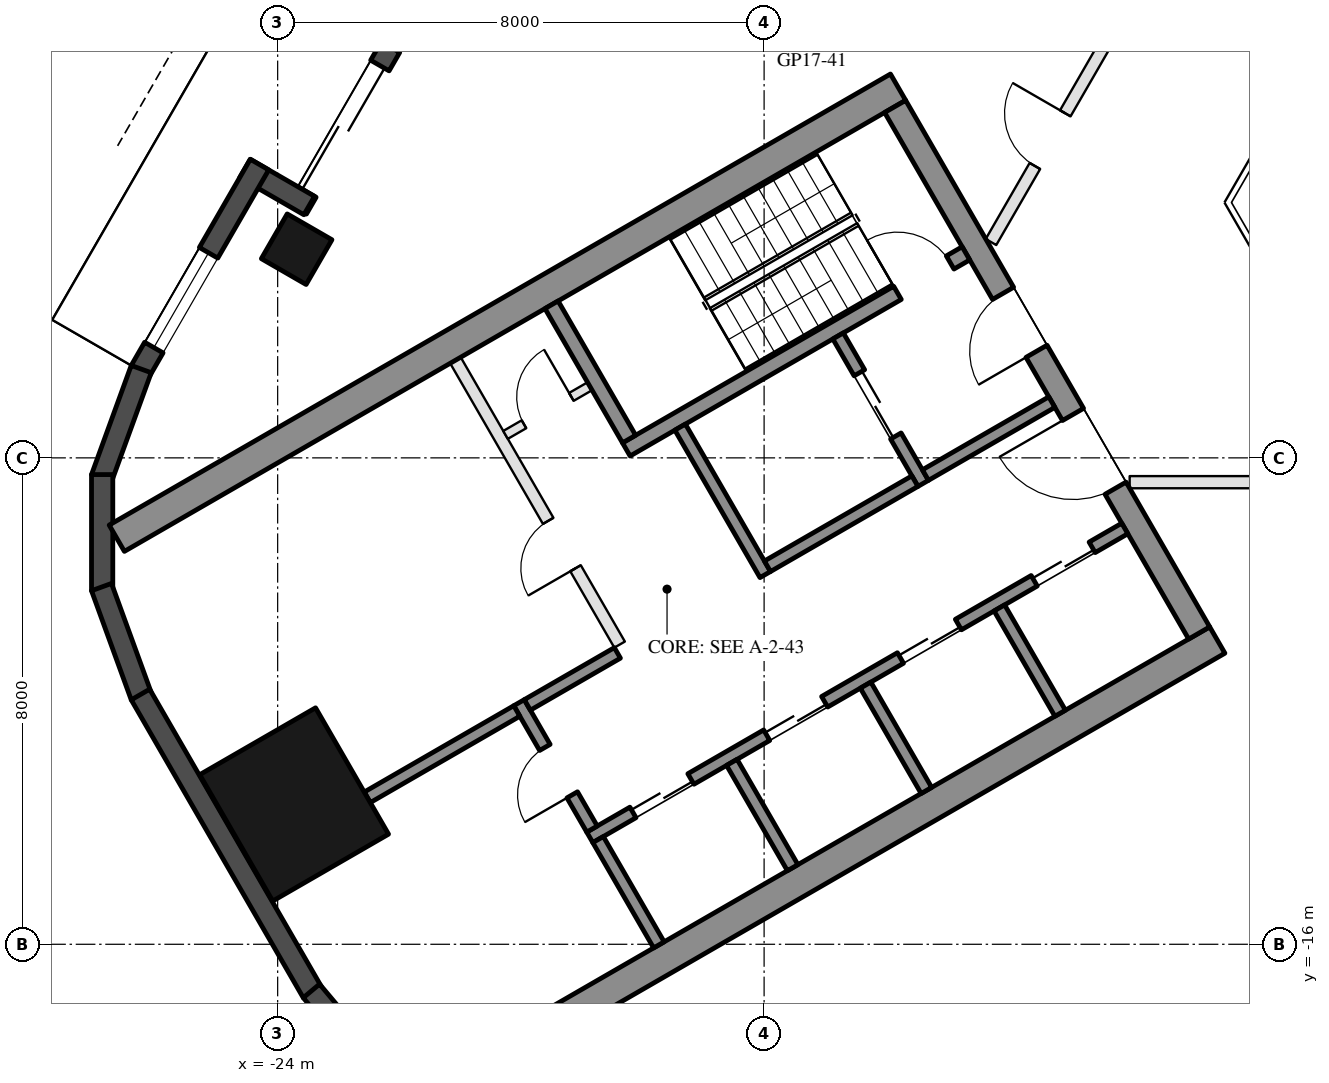
"""IFC4 building model, lengths in metres.
Left out: names, types, materials, properties, quantities, classifications, styles, units other than length and angle.
Written with IfcOpenShell. Run it as: python <this file> out.ifc"""

import sys

from ifc_helpers import new_model, si_unit, direction, frame, frame_2d, origin, origin_2d, place, context, subcontext, project, spatial, rectangle, hollow_rectangle, extrude, element, fill, save


model = new_model("IFC4")
c1 = context("Model", 3, precision=1e-05, world=origin(), true_north=direction((0.0, 1.0)))
c2 = subcontext(c1, "Body", "Model", "MODEL_VIEW")
j1 = project(units=[si_unit("LENGTHUNIT", "METRE"), si_unit("PLANEANGLEUNIT", "RADIAN")], contexts=[c1])
p1 = place(None, origin())
s1 = spatial("IfcSite", under=j1, at=p1, CompositionType="ELEMENT")
p2 = place(p1, origin())
s2 = spatial("IfcBuilding", under=s1, at=p2, CompositionType="ELEMENT")
p3 = place(p2, frame((0.0, 0.0, 183.6)))
s3 = spatial("IfcBuildingStorey", under=s2, at=p3, CompositionType="ELEMENT", Elevation=183.6)
p4 = place(p3, frame((-23.688, -4.568, 0.0), z_axis=(0.0, 0.0, 1.0), x_axis=(0.5, 0.866025403784, 0.0)))
e1 = element("IfcColumn", 1, at=p4, inside=s3, PredefinedType="COLUMN", context=c2, shape_type="SweptSolid", body=[
    extrude(hollow_rectangle(XDim=0.85, YDim=0.85, WallThickness=0.04, at=origin_2d()), origin(), (0.0, 0.0, 1.0), 3.7),
])
p5 = place(p3, frame((-23.729, -13.7, 0.0), z_axis=(0.0, 0.0, 1.0), x_axis=(-0.5, 0.866025403784, 0.0)))
e2 = element("IfcColumn", 2, at=p5, inside=s3, PredefinedType="COLUMN", context=c2, shape_type="SweptSolid", body=[
    extrude(hollow_rectangle(XDim=2.4, YDim=2.2, WallThickness=0.06, at=origin_2d()), origin(), (0.0, 0.0, 1.0), 3.7),
])
p6 = place(p3, frame((-20.309, 1.934, 0.0), z_axis=(0.0, 0.0, 1.0), x_axis=(-0.499992114976, -0.866029956157, 0.0)))
e3 = element("IfcWall", 3, at=p6, inside=s3, PredefinedType="SOLIDWALL", context=c2, shape_type="SweptSolid", body=[
    extrude(rectangle(XDim=6.74, YDim=0.35, at=frame_2d((3.37, 0.0))), origin(), (0.0, 0.0, 1.0), 3.55),
])
p7 = place(p6, frame((4.02, 0.0, 0.0)))
e4 = element("IfcOpeningElement", 4, at=p7, cuts=e3, PredefinedType="OPENING", context=c2, shape_type="SweptSolid", body=[
    extrude(rectangle(XDim=2.4, YDim=2.4, at=frame_2d((1.2, 1.2))), frame((0.0, 0.185, 0.0), z_axis=(0.0, -1.0, 0.0), x_axis=(1.0, 0.0, 0.0)), (0.0, 0.0, 1.0), 0.37),
])
p8 = place(p6, frame((0.77, 0.0, 0.3)))
e5 = element("IfcOpeningElement", 5, at=p8, cuts=e3, PredefinedType="OPENING", context=c2, shape_type="SweptSolid", body=[
    extrude(rectangle(XDim=2.9, YDim=2.65, at=frame_2d((1.45, 1.325))), frame((0.0, 0.185, 0.0), z_axis=(0.0, -1.0, 0.0), x_axis=(1.0, 0.0, 0.0)), (0.0, 0.0, 1.0), 0.37),
])
p9 = place(p3, frame((-23.481, -3.85, 0.0), z_axis=(0.0, 0.0, 1.0), x_axis=(-0.866092288191, 0.499884134912, 0.0)))
e6 = element("IfcWall", 6, at=p9, inside=s3, PredefinedType="SOLIDWALL", context=c2, shape_type="SweptSolid", body=[
    extrude(rectangle(XDim=1.22, YDim=0.35, at=frame_2d((0.61, 0.0))), origin(), (0.0, 0.0, 1.0), 3.55),
])
p10 = place(p3, frame((-24.299, -3.176, 0.0), z_axis=(0.0, 0.0, 1.0), x_axis=(-0.500028278809, -0.866009076391, 0.0)))
e7 = element("IfcWall", 7, at=p10, inside=s3, PredefinedType="SOLIDWALL", context=c2, shape_type="SweptSolid", body=[
    extrude(rectangle(XDim=3.916, YDim=0.35, at=frame_2d((1.958, 0.0))), origin(), (0.0, 0.0, 1.0), 3.55),
])
p11 = place(p10, frame((1.675, 0.0, 0.3)))
e8 = element("IfcOpeningElement", 8, at=p11, cuts=e7, PredefinedType="OPENING", context=c2, shape_type="SweptSolid", body=[
    extrude(rectangle(XDim=1.8, YDim=2.65, at=frame_2d((0.9, 1.325))), frame((0.0, 0.185, 0.0), z_axis=(0.0, -1.0, 0.0), x_axis=(1.0, 0.0, 0.0)), (0.0, 0.0, 1.0), 0.37),
])
for number, where, z_axis, x_axis in (
    (9, (-26.244, -6.54, 0.0), (0.0, 0.0, 1.0), (-0.342, -0.94, 0.0)),
    (10, (-26.886, -8.275, 0.0), (0.0, 0.0, 1.0), (0.0, -1.0, 0.0)),
    (11, (-26.897, -10.125, 0.0), (0.0, 0.0, 1.0), (0.342, -0.94, 0.0)),
):
    element("IfcWall", number, at=place(p3, frame(where, z_axis=z_axis, x_axis=x_axis)), inside=s3, PredefinedType="SOLIDWALL", context=c2, shape_type="SweptSolid", body=[
        extrude(rectangle(XDim=1.91, YDim=0.35, at=frame_2d((0.955, 0.0))), origin(), (0.0, 0.0, 1.0), 3.55),
    ])
p12 = place(p3, frame((-26.257, -11.893, 0.0), z_axis=(0.0, 0.0, 1.0), x_axis=(0.500018773155, -0.866014564827, 0.0)))
e12 = element("IfcWall", 12, at=p12, inside=s3, PredefinedType="SOLIDWALL", context=c2, shape_type="SweptSolid", body=[
    extrude(rectangle(XDim=5.658, YDim=0.35, at=frame_2d((2.829, 0.0))), origin(), (0.0, 0.0, 1.0), 3.55),
])
p13 = place(p3, frame((-23.445, -16.768, 0.0), z_axis=(0.0, 0.0, 1.0), x_axis=(0.642733291068, -0.76609001857, 0.0)))
e13 = element("IfcWall", 13, at=p13, inside=s3, PredefinedType="SOLIDWALL", context=c2, shape_type="SweptSolid", body=[
    extrude(rectangle(XDim=1.91, YDim=0.35, at=frame_2d((0.955, 0.0))), origin(), (0.0, 0.0, 1.0), 3.55),
])
for number, where, z_axis, x_axis in (
    (14, (-13.797, -1.903, 0.0), (0.0, 0.0, 1.0), (-0.866, -0.5, 0.0)),
    (15, (-8.547, -10.997, 0.0), (0.0, 0.0, 1.0), (-0.866, -0.5, 0.0)),
):
    element("IfcWall", number, at=place(p3, frame(where, z_axis=z_axis, x_axis=x_axis)), inside=s3, PredefinedType="SHEAR", context=c2, shape_type="SweptSolid", body=[
        extrude(rectangle(XDim=14.837, YDim=0.5, at=frame_2d((7.418, 0.0))), origin(), (0.0, 0.0, 1.0), 3.5),
    ])
p14 = place(p3, frame((-13.845, -2.22, 0.0), z_axis=(0.0, 0.0, 1.0), x_axis=(0.500004234368, -0.866022959057, 0.0)))
e16 = element("IfcWall", 16, at=p14, inside=s3, PredefinedType="SHEAR", context=c2, shape_type="SweptSolid", body=[
    extrude(rectangle(XDim=10.0, YDim=0.4, at=frame_2d((5.0, 0.0))), origin(), (0.0, 0.0, 1.0), 3.5),
])
p15 = place(p14, frame((3.55, 0.0, 0.0)))
e17 = element("IfcOpeningElement", 17, at=p15, cuts=e16, PredefinedType="OPENING", context=c2, shape_type="SweptSolid", body=[
    extrude(rectangle(XDim=1.1, YDim=2.1, at=frame_2d((0.55, 1.05))), frame((0.0, 0.21, 0.0), z_axis=(0.0, -1.0, 0.0), x_axis=(1.0, 0.0, 0.0)), (0.0, 0.0, 1.0), 0.42),
])
p16 = place(p14, frame((5.85, 0.0, 0.0)))
e18 = element("IfcOpeningElement", 18, at=p16, cuts=e16, PredefinedType="OPENING", context=c2, shape_type="SweptSolid", body=[
    extrude(rectangle(XDim=1.4, YDim=2.1, at=frame_2d((0.7, 1.05))), frame((0.0, 0.21, 0.0), z_axis=(0.0, -1.0, 0.0), x_axis=(1.0, 0.0, 0.0)), (0.0, 0.0, 1.0), 0.42),
])
p17 = place(p3, frame((-12.681, -4.636, 0.0), z_axis=(0.0, 0.0, 1.0), x_axis=(-0.866021702275, -0.500006411147, 0.0)))
e19 = element("IfcWall", 19, at=p17, inside=s3, PredefinedType="SHEAR", context=c2, shape_type="SweptSolid", body=[
    extrude(rectangle(XDim=6.45, YDim=0.25, at=frame_2d((3.225, 0.0))), origin(), (0.0, 0.0, 1.0), 3.5),
])
p18 = place(p17, frame((0.3, 0.0, 0.0)))
e20 = element("IfcOpeningElement", 20, at=p18, cuts=e19, PredefinedType="OPENING", context=c2, shape_type="SweptSolid", body=[
    extrude(rectangle(XDim=1.0, YDim=2.1, at=frame_2d((0.5, 1.05))), frame((0.0, 0.135, 0.0), z_axis=(0.0, -1.0, 0.0), x_axis=(1.0, 0.0, 0.0)), (0.0, 0.0, 1.0), 0.27),
])
p19 = place(p3, frame((-19.496, -5.482, 0.0), z_axis=(0.0, 0.0, 1.0), x_axis=(0.499990435942, -0.866030925526, 0.0)))
e21 = element("IfcWall", 21, at=p19, inside=s3, PredefinedType="SHEAR", context=c2, shape_type="SweptSolid", body=[
    extrude(rectangle(XDim=2.55, YDim=0.25, at=frame_2d((1.275, 0.0))), origin(), (0.0, 0.0, 1.0), 3.5),
])
p20 = place(p3, frame((-17.381, -7.495, 0.0), z_axis=(0.0, 0.0, 1.0), x_axis=(0.500011755427, -0.866018616679, 0.0)))
e22 = element("IfcWall", 22, at=p20, inside=s3, PredefinedType="SHEAR", context=c2, shape_type="SweptSolid", body=[
    extrude(rectangle(XDim=2.8, YDim=0.2, at=frame_2d((1.4, 0.0))), origin(), (0.0, 0.0, 1.0), 3.5),
])
p21 = place(p3, frame((-14.783, -5.995, 0.0), z_axis=(0.0, 0.0, 1.0), x_axis=(0.49994636267, -0.866056369097, 0.0)))
e23 = element("IfcWall", 23, at=p21, inside=s3, PredefinedType="SHEAR", context=c2, shape_type="SweptSolid", body=[
    extrude(rectangle(XDim=2.8, YDim=0.2, at=frame_2d((1.4, 0.0))), origin(), (0.0, 0.0, 1.0), 3.5),
])
p22 = place(p21, frame((0.7, 0.0, 0.0)))
e24 = element("IfcOpeningElement", 24, at=p22, cuts=e23, PredefinedType="OPENING", context=c2, shape_type="SweptSolid", body=[
    extrude(rectangle(XDim=1.2, YDim=2.1, at=frame_2d((0.6, 1.05))), frame((0.0, 0.11, 0.0), z_axis=(0.0, -1.0, 0.0), x_axis=(1.0, 0.0, 0.0)), (0.0, 0.0, 1.0), 0.22),
])
p23 = place(p3, frame((-13.52, -8.383, 0.0), z_axis=(0.0, 0.0, 1.0), x_axis=(-0.866034573852, -0.49998411664, 0.0)))
e25 = element("IfcWall", 25, at=p23, inside=s3, PredefinedType="SHEAR", context=c2, shape_type="SweptSolid", body=[
    extrude(rectangle(XDim=2.8, YDim=0.2, at=frame_2d((1.4, 0.0))), origin(), (0.0, 0.0, 1.0), 3.5),
])
p24 = place(p3, frame((-11.268, -7.083, 0.0), z_axis=(0.0, 0.0, 1.0), x_axis=(-0.866050077142, -0.499957262057, 0.0)))
e26 = element("IfcWall", 26, at=p24, inside=s3, PredefinedType="SHEAR", context=c2, shape_type="SweptSolid", body=[
    extrude(rectangle(XDim=2.4, YDim=0.2, at=frame_2d((1.2, 0.0))), origin(), (0.0, 0.0, 1.0), 3.5),
])
p25 = place(p3, frame((-10.068, -9.162, 0.0), z_axis=(0.0, 0.0, 1.0), x_axis=(-0.866032725843, -0.499987317609, 0.0)))
e27 = element("IfcWall", 27, at=p25, inside=s3, PredefinedType="SHEAR", context=c2, shape_type="SweptSolid", body=[
    extrude(rectangle(XDim=10.16, YDim=0.2, at=frame_2d((5.08, 0.0))), origin(), (0.0, 0.0, 1.0), 3.5),
])
p26 = place(p25, frame((0.62, 0.0, 0.0)))
e28 = element("IfcOpeningElement", 28, at=p26, cuts=e27, PredefinedType="OPENING", context=c2, shape_type="SweptSolid", body=[
    extrude(rectangle(XDim=1.1, YDim=2.1, at=frame_2d((0.55, 1.05))), frame((0.0, 0.11, 0.0), z_axis=(0.0, -1.0, 0.0), x_axis=(1.0, 0.0, 0.0)), (0.0, 0.0, 1.0), 0.22),
])
p27 = place(p25, frame((3.16, 0.0, 0.0)))
e29 = element("IfcOpeningElement", 29, at=p27, cuts=e27, PredefinedType="OPENING", context=c2, shape_type="SweptSolid", body=[
    extrude(rectangle(XDim=1.1, YDim=2.1, at=frame_2d((0.55, 1.05))), frame((0.0, 0.11, 0.0), z_axis=(0.0, -1.0, 0.0), x_axis=(1.0, 0.0, 0.0)), (0.0, 0.0, 1.0), 0.22),
])
p28 = place(p25, frame((5.7, 0.0, 0.0)))
e30 = element("IfcOpeningElement", 30, at=p28, cuts=e27, PredefinedType="OPENING", context=c2, shape_type="SweptSolid", body=[
    extrude(rectangle(XDim=1.1, YDim=2.1, at=frame_2d((0.55, 1.05))), frame((0.0, 0.11, 0.0), z_axis=(0.0, -1.0, 0.0), x_axis=(1.0, 0.0, 0.0)), (0.0, 0.0, 1.0), 0.22),
])
p29 = place(p25, frame((8.24, 0.0, 0.0)))
e31 = element("IfcOpeningElement", 31, at=p29, cuts=e27, PredefinedType="OPENING", context=c2, shape_type="SweptSolid", body=[
    extrude(rectangle(XDim=1.1, YDim=2.1, at=frame_2d((0.55, 1.05))), frame((0.0, 0.11, 0.0), z_axis=(0.0, -1.0, 0.0), x_axis=(1.0, 0.0, 0.0)), (0.0, 0.0, 1.0), 0.22),
])
p30 = place(p3, frame((-20.031, -12.026, 0.0), z_axis=(0.0, 0.0, 1.0), x_axis=(0.500033551112, -0.866006032174, 0.0)))
e32 = element("IfcWall", 32, at=p30, inside=s3, PredefinedType="SHEAR", context=c2, shape_type="SweptSolid", body=[
    extrude(rectangle(XDim=2.4, YDim=0.2, at=frame_2d((1.2, 0.0))), origin(), (0.0, 0.0, 1.0), 3.5),
])
p31 = place(p30, frame((0.85, 0.0, 0.0)))
e33 = element("IfcOpeningElement", 33, at=p31, cuts=e32, PredefinedType="OPENING", context=c2, shape_type="SweptSolid", body=[
    extrude(rectangle(XDim=0.9, YDim=2.1, at=frame_2d((0.45, 1.05))), frame((0.0, 0.11, 0.0), z_axis=(0.0, -1.0, 0.0), x_axis=(1.0, 0.0, 0.0)), (0.0, 0.0, 1.0), 0.22),
])
p32 = place(p3, frame((-18.413, -11.208, 0.0), z_axis=(0.0, 0.0, 1.0), x_axis=(-0.866038183914, -0.499977863513, 0.0)))
e34 = element("IfcWall", 34, at=p32, inside=s3, PredefinedType="SHEAR", context=c2, shape_type="SweptSolid", body=[
    extrude(rectangle(XDim=1.71, YDim=0.2, at=frame_2d((0.855, 0.0))), origin(), (0.0, 0.0, 1.0), 3.5),
])
for number, where, z_axis, x_axis in (
    (35, (-12.131, -10.468, 0.0), (0.0, 0.0, 1.0), (0.5, -0.866, 0.0)),
    (36, (-14.331, -11.738, 0.0), (0.0, 0.0, 1.0), (0.5, -0.866, 0.0)),
    (37, (-16.531, -13.008, 0.0), (0.0, 0.0, 1.0), (0.5, -0.866, 0.0)),
    (38, (-18.73, -14.278, 0.0), (0.0, 0.0, 1.0), (0.5, -0.866, 0.0)),
):
    element("IfcWall", number, at=place(p3, frame(where, z_axis=z_axis, x_axis=x_axis)), inside=s3, PredefinedType="SHEAR", context=c2, shape_type="SweptSolid", body=[
        extrude(rectangle(XDim=2.0, YDim=0.2, at=frame_2d((1.0, 0.0))), origin(), (0.0, 0.0, 1.0), 3.5),
    ])
p33 = place(p3, frame((-20.067, -12.163, 0.0), z_axis=(0.0, 0.0, 1.0), x_axis=(-0.866055327414, -0.49994816717, 0.0)))
e39 = element("IfcWall", 39, at=p33, inside=s3, PredefinedType="SHEAR", context=c2, shape_type="SweptSolid", body=[
    extrude(rectangle(XDim=2.84, YDim=0.2, at=frame_2d((1.42, 0.0))), origin(), (0.0, 0.0, 1.0), 3.5),
])
p34 = place(p3, frame((-21.076, -6.395, 0.0), z_axis=(0.0, 0.0, 1.0), x_axis=(0.50001468107, -0.866016927499, 0.0)))
e40 = element("IfcWall", 40, at=p34, inside=s3, PredefinedType="PARTITIONING", context=c2, shape_type="SweptSolid", body=[
    extrude(rectangle(XDim=5.4, YDim=0.2, at=frame_2d((2.7, 0.0))), origin(), (0.0, 0.0, 1.0), 3.5),
])
p35 = place(p34, frame((3.05, 0.0, 0.0)))
e41 = element("IfcOpeningElement", 41, at=p35, cuts=e40, PredefinedType="OPENING", context=c2, shape_type="SweptSolid", body=[
    extrude(rectangle(XDim=0.9, YDim=2.1, at=frame_2d((0.45, 1.05))), frame((0.0, 0.11, 0.0), z_axis=(0.0, -1.0, 0.0), x_axis=(1.0, 0.0, 0.0)), (0.0, 0.0, 1.0), 0.22),
])
p36 = place(p3, frame((-18.866, -6.822, 0.0), z_axis=(0.0, 0.0, 1.0), x_axis=(-0.866028054938, -0.499995408039, 0.0)))
e42 = element("IfcWall", 42, at=p36, inside=s3, PredefinedType="PARTITIONING", context=c2, shape_type="SweptSolid", body=[
    extrude(rectangle(XDim=1.6, YDim=0.15, at=frame_2d((0.8, 0.0))), origin(), (0.0, 0.0, 1.0), 3.5),
])
p37 = place(p36, frame((0.35, 0.0, 0.0)))
e43 = element("IfcOpeningElement", 43, at=p37, cuts=e42, PredefinedType="OPENING", context=c2, shape_type="SweptSolid", body=[
    extrude(rectangle(XDim=0.9, YDim=2.1, at=frame_2d((0.45, 1.05))), frame((0.0, 0.085, 0.0), z_axis=(0.0, -1.0, 0.0), x_axis=(1.0, 0.0, 0.0)), (0.0, 0.0, 1.0), 0.17),
])
p38 = place(p3, frame((-3.803, -8.4, 0.0), z_axis=(0.0, 0.0, 1.0), x_axis=(-1.0, 0.0, 0.0)))
e44 = element("IfcWall", 44, at=p38, inside=s3, PredefinedType="PARTITIONING", context=c2, shape_type="SweptSolid", body=[
    extrude(rectangle(XDim=6.185, YDim=0.2, at=frame_2d((3.092, 0.0))), origin(), (0.0, 0.0, 1.0), 2.95),
])
p39 = place(p38, frame((2.592, 0.0, 0.0)))
e45 = element("IfcOpeningElement", 45, at=p39, cuts=e44, PredefinedType="OPENING", context=c2, shape_type="SweptSolid", body=[
    extrude(rectangle(XDim=1.0, YDim=2.1, at=frame_2d((0.5, 1.05))), frame((0.0, 0.11, 0.0), z_axis=(0.0, -1.0, 0.0), x_axis=(1.0, 0.0, 0.0)), (0.0, 0.0, 1.0), 0.22),
])
p40 = place(p3, frame((-12.269, -4.45, 0.0), z_axis=(0.0, 0.0, 1.0), x_axis=(0.500008716408, 0.866020371305, 0.0)))
e46 = element("IfcWall", 46, at=p40, inside=s3, PredefinedType="PARTITIONING", context=c2, shape_type="SweptSolid", body=[
    extrude(rectangle(XDim=3.888, YDim=0.2, at=frame_2d((1.944, 0.0))), origin(), (0.0, 0.0, 1.0), 2.95),
])
p41 = place(p40, frame((1.444, 0.0, 0.0)))
e47 = element("IfcOpeningElement", 47, at=p41, cuts=e46, PredefinedType="OPENING", context=c2, shape_type="SweptSolid", body=[
    extrude(rectangle(XDim=1.0, YDim=2.1, at=frame_2d((0.5, 1.05))), frame((0.0, 0.11, 0.0), z_axis=(0.0, -1.0, 0.0), x_axis=(1.0, 0.0, 0.0)), (0.0, 0.0, 1.0), 0.22),
])
p42 = place(p7, frame((2.4, 0.0, 0.0), z_axis=(0.0, 0.0, 1.0), x_axis=(-1.0, 0.0, 0.0)))
e48 = element("IfcDoor", 48, at=p42, inside=s3, OperationType="SLIDING_TO_LEFT", PredefinedType="DOOR", context=c2, shape_type="SweptSolid", body=[
    extrude(rectangle(XDim=2.4, YDim=2.4, at=frame_2d((1.2, 1.2))), frame((0.0, 0.025, 0.0), z_axis=(0.0, -1.0, 0.0), x_axis=(1.0, 0.0, 0.0)), (0.0, 0.0, 1.0), 0.05),
])
fill(e4, e48)
p43 = place(p11, origin())
e49 = element("IfcWindow", 49, at=p43, inside=s3, PartitioningType="SINGLE_PANEL", PredefinedType="WINDOW", context=c2, shape_type="SweptSolid", body=[
    extrude(rectangle(XDim=1.8, YDim=2.65, at=frame_2d((0.9, 1.325))), frame((0.0, 0.03, 0.0), z_axis=(0.0, -1.0, 0.0), x_axis=(1.0, 0.0, 0.0)), (0.0, 0.0, 1.0), 0.06),
])
fill(e8, e49)
p44 = place(p22, origin())
e50 = element("IfcDoor", 50, at=p44, inside=s3, OperationType="DOUBLE_DOOR_SLIDING", PredefinedType="DOOR", context=c2, shape_type="SweptSolid", body=[
    extrude(rectangle(XDim=1.2, YDim=2.1, at=frame_2d((0.6, 1.05))), frame((0.0, 0.025, 0.0), z_axis=(0.0, -1.0, 0.0), x_axis=(1.0, 0.0, 0.0)), (0.0, 0.0, 1.0), 0.05),
])
fill(e24, e50)
p45 = place(p37, frame((0.9, 0.0, 0.0), z_axis=(0.0, 0.0, 1.0), x_axis=(-1.0, 0.0, 0.0)))
e51 = element("IfcDoor", 51, at=p45, inside=s3, OperationType="SINGLE_SWING_RIGHT", PredefinedType="DOOR", context=c2, shape_type="SweptSolid", body=[
    extrude(rectangle(XDim=0.9, YDim=2.1, at=frame_2d((0.45, 1.05))), frame((0.0, 0.025, 0.0), z_axis=(0.0, -1.0, 0.0), x_axis=(1.0, 0.0, 0.0)), (0.0, 0.0, 1.0), 0.05),
])
fill(e43, e51)
p46 = place(p26, origin())
e52 = element("IfcDoor", 52, at=p46, inside=s3, OperationType="DOUBLE_DOOR_SLIDING", PredefinedType="DOOR", context=c2, shape_type="SweptSolid", body=[
    extrude(rectangle(XDim=1.1, YDim=2.1, at=frame_2d((0.55, 1.05))), frame((0.0, 0.025, 0.0), z_axis=(0.0, -1.0, 0.0), x_axis=(1.0, 0.0, 0.0)), (0.0, 0.0, 1.0), 0.05),
])
fill(e28, e52)
p47 = place(p27, origin())
e53 = element("IfcDoor", 53, at=p47, inside=s3, OperationType="DOUBLE_DOOR_SLIDING", PredefinedType="DOOR", context=c2, shape_type="SweptSolid", body=[
    extrude(rectangle(XDim=1.1, YDim=2.1, at=frame_2d((0.55, 1.05))), frame((0.0, 0.025, 0.0), z_axis=(0.0, -1.0, 0.0), x_axis=(1.0, 0.0, 0.0)), (0.0, 0.0, 1.0), 0.05),
])
fill(e29, e53)
p48 = place(p28, origin())
e54 = element("IfcDoor", 54, at=p48, inside=s3, OperationType="DOUBLE_DOOR_SLIDING", PredefinedType="DOOR", context=c2, shape_type="SweptSolid", body=[
    extrude(rectangle(XDim=1.1, YDim=2.1, at=frame_2d((0.55, 1.05))), frame((0.0, 0.025, 0.0), z_axis=(0.0, -1.0, 0.0), x_axis=(1.0, 0.0, 0.0)), (0.0, 0.0, 1.0), 0.05),
])
fill(e30, e54)
p49 = place(p29, origin())
e55 = element("IfcDoor", 55, at=p49, inside=s3, OperationType="DOUBLE_DOOR_SLIDING", PredefinedType="DOOR", context=c2, shape_type="SweptSolid", body=[
    extrude(rectangle(XDim=1.1, YDim=2.1, at=frame_2d((0.55, 1.05))), frame((0.0, 0.025, 0.0), z_axis=(0.0, -1.0, 0.0), x_axis=(1.0, 0.0, 0.0)), (0.0, 0.0, 1.0), 0.05),
])
fill(e31, e55)
p50 = place(p31, frame((0.9, 0.0, 0.0), z_axis=(0.0, 0.0, 1.0), x_axis=(-1.0, 0.0, 0.0)))
e56 = element("IfcDoor", 56, at=p50, inside=s3, OperationType="SINGLE_SWING_LEFT", PredefinedType="DOOR", context=c2, shape_type="SweptSolid", body=[
    extrude(rectangle(XDim=0.9, YDim=2.1, at=frame_2d((0.45, 1.05))), frame((0.0, 0.025, 0.0), z_axis=(0.0, -1.0, 0.0), x_axis=(1.0, 0.0, 0.0)), (0.0, 0.0, 1.0), 0.05),
])
fill(e33, e56)
p51 = place(p35, frame((0.9, 0.0, 0.0), z_axis=(0.0, 0.0, 1.0), x_axis=(-1.0, 0.0, 0.0)))
e57 = element("IfcDoor", 57, at=p51, inside=s3, OperationType="SINGLE_SWING_LEFT", PredefinedType="DOOR", context=c2, shape_type="SweptSolid", body=[
    extrude(rectangle(XDim=0.9, YDim=2.1, at=frame_2d((0.45, 1.05))), frame((0.0, 0.025, 0.0), z_axis=(0.0, -1.0, 0.0), x_axis=(1.0, 0.0, 0.0)), (0.0, 0.0, 1.0), 0.05),
])
fill(e41, e57)
p52 = place(p15, frame((1.1, 0.0, 0.0), z_axis=(0.0, 0.0, 1.0), x_axis=(-1.0, 0.0, 0.0)))
e58 = element("IfcDoor", 58, at=p52, inside=s3, OperationType="SINGLE_SWING_LEFT", PredefinedType="DOOR", context=c2, shape_type="SweptSolid", body=[
    extrude(rectangle(XDim=1.1, YDim=2.1, at=frame_2d((0.55, 1.05))), frame((0.0, 0.025, 0.0), z_axis=(0.0, -1.0, 0.0), x_axis=(1.0, 0.0, 0.0)), (0.0, 0.0, 1.0), 0.05),
])
fill(e17, e58)
p53 = place(p16, frame((1.4, 0.0, 0.0), z_axis=(0.0, 0.0, 1.0), x_axis=(-1.0, 0.0, 0.0)))
e59 = element("IfcDoor", 59, at=p53, inside=s3, OperationType="DOUBLE_DOOR_SINGLE_SWING", PredefinedType="DOOR", context=c2, shape_type="SweptSolid", body=[
    extrude(rectangle(XDim=1.4, YDim=2.1, at=frame_2d((0.7, 1.05))), frame((0.0, 0.025, 0.0), z_axis=(0.0, -1.0, 0.0), x_axis=(1.0, 0.0, 0.0)), (0.0, 0.0, 1.0), 0.05),
])
fill(e18, e59)
p54 = place(p18, frame((1.0, 0.0, 0.0), z_axis=(0.0, 0.0, 1.0), x_axis=(-1.0, 0.0, 0.0)))
e60 = element("IfcDoor", 60, at=p54, inside=s3, OperationType="SINGLE_SWING_LEFT", PredefinedType="DOOR", context=c2, shape_type="SweptSolid", body=[
    extrude(rectangle(XDim=1.0, YDim=2.1, at=frame_2d((0.5, 1.05))), frame((0.0, 0.025, 0.0), z_axis=(0.0, -1.0, 0.0), x_axis=(1.0, 0.0, 0.0)), (0.0, 0.0, 1.0), 0.05),
])
fill(e20, e60)
p55 = place(p41, origin())
e61 = element("IfcDoor", 61, at=p55, inside=s3, OperationType="SINGLE_SWING_RIGHT", PredefinedType="DOOR", context=c2, shape_type="SweptSolid", body=[
    extrude(rectangle(XDim=1.0, YDim=2.1, at=frame_2d((0.5, 1.05))), frame((0.0, 0.025, 0.0), z_axis=(0.0, -1.0, 0.0), x_axis=(1.0, 0.0, 0.0)), (0.0, 0.0, 1.0), 0.05),
])
fill(e47, e61)
save(model, sys.argv[1])
